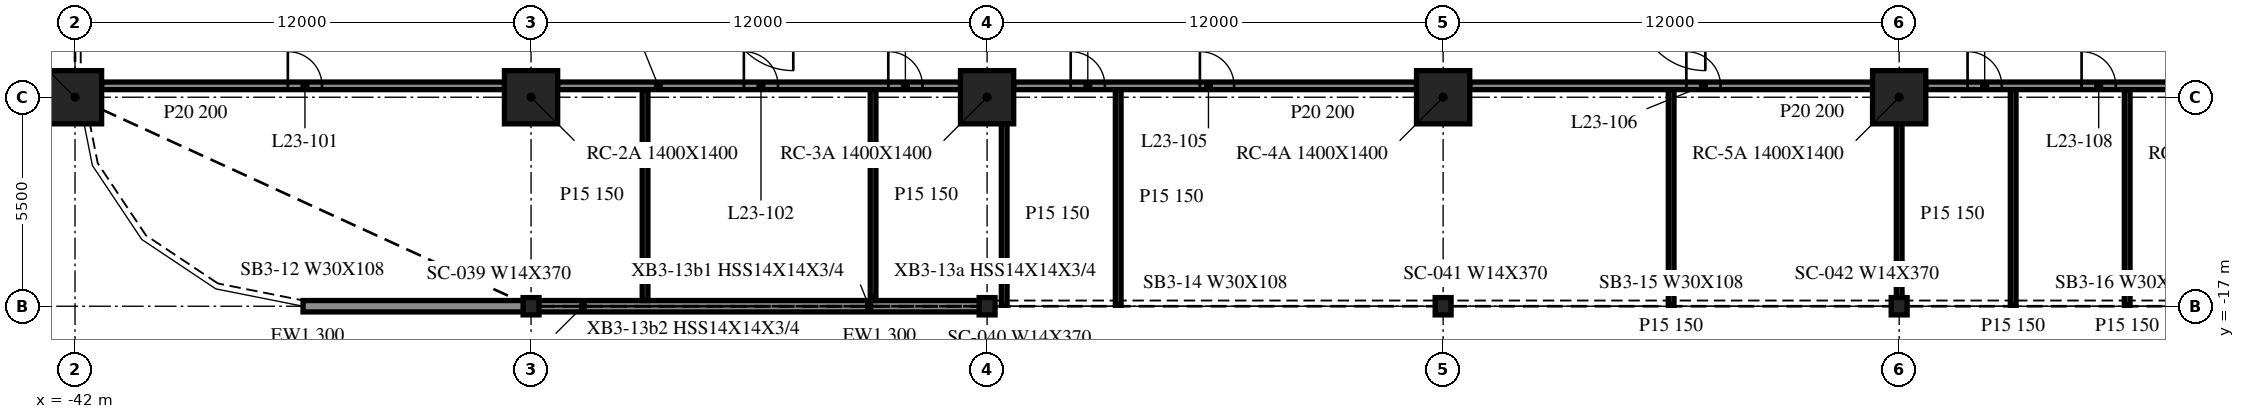
"""IFC4 building model, lengths in metres.
Left out: names, types, materials, properties, quantities, classifications, styles, units other than length and angle.
Written with IfcOpenShell. Run it as: python <this file> out.ifc"""

import sys

from ifc_helpers import new_model, si_unit, direction, frame, frame_2d, origin, origin_2d, place, context, subcontext, project, spatial, rectangle, i_section, extrude, element, fill, save


model = new_model("IFC4")
c1 = context("Model", 3, precision=1e-05, world=origin(), true_north=direction((0.0, 1.0)))
c2 = subcontext(c1, "Body", "Model", "MODEL_VIEW")
j1 = project(units=[si_unit("LENGTHUNIT", "METRE"), si_unit("PLANEANGLEUNIT", "RADIAN")], contexts=[c1])
p1 = place(None, origin())
s1 = spatial("IfcSite", under=j1, at=p1, CompositionType="ELEMENT")
p2 = place(p1, origin())
s2 = spatial("IfcBuilding", under=s1, at=p2, CompositionType="ELEMENT")
p3 = place(p2, frame((0.0, 0.0, 101.2)))
s3 = spatial("IfcBuildingStorey", under=s2, at=p3, CompositionType="ELEMENT", Elevation=101.2)
for number, where, z_axis, x_axis in (
    (1, (-42.0, -11.5, -0.34), (0.0, 0.0, 1.0), (1.0, 0.0, 0.0)),
    (2, (-30.0, -11.5, -0.34), (0.0, 0.0, 1.0), (1.0, 0.0, 0.0)),
    (3, (-18.0, -11.5, -0.34), (0.0, 0.0, 1.0), (1.0, 0.0, 0.0)),
    (4, (-6.0, -11.5, -0.34), (0.0, 0.0, 1.0), (1.0, 0.0, 0.0)),
    (5, (6.0, -11.5, -0.34), (0.0, 0.0, 1.0), (1.0, 0.0, 0.0)),
):
    element("IfcColumn", number, at=place(p3, frame(where, z_axis=z_axis, x_axis=x_axis)), inside=s3, PredefinedType="COLUMN", context=c2, shape_type="SweptSolid", body=[
        extrude(rectangle(XDim=1.4, YDim=1.4, at=origin_2d()), origin(), (0.0, 0.0, 1.0), 4.1),
    ])
for number, where, z_axis, x_axis in (
    (6, (-30.0, -17.0, -0.34), (0.0, 0.0, 1.0), (1.0, 0.0, 0.0)),
    (7, (-18.0, -17.0, -0.34), (0.0, 0.0, 1.0), (1.0, 0.0, 0.0)),
    (8, (-6.0, -17.0, -0.34), (0.0, 0.0, 1.0), (1.0, 0.0, 0.0)),
    (9, (6.0, -17.0, -0.34), (0.0, 0.0, 1.0), (1.0, 0.0, 0.0)),
):
    element("IfcColumn", number, at=place(p3, frame(where, z_axis=z_axis, x_axis=x_axis)), inside=s3, PredefinedType="COLUMN", context=c2, shape_type="SweptSolid", body=[
        extrude(i_section(OverallWidth=0.419, OverallDepth=0.455, WebThickness=0.042, FlangeThickness=0.068, at=origin_2d()), origin(), (0.0, 0.0, 1.0), 4.1),
    ])
p4 = place(p3, frame((-36.0, -17.0, 0.0), z_axis=(0.0, 0.0, 1.0), x_axis=(1.0, 0.0, 0.0)))
e10 = element("IfcWall", 10, at=p4, inside=s3, PredefinedType="NOTDEFINED", context=c2, shape_type="SweptSolid", body=[
    extrude(rectangle(XDim=5.979, YDim=0.3, at=frame_2d((2.99, 0.0))), origin(), (0.0, 0.0, 1.0), 3.003),
])
p5 = place(p3, frame((-29.979, -17.0, 0.0), z_axis=(0.0, 0.0, 1.0), x_axis=(1.0, 0.0, 0.0)))
e11 = element("IfcWall", 11, at=p5, inside=s3, PredefinedType="NOTDEFINED", context=c2, shape_type="SweptSolid", body=[
    extrude(rectangle(XDim=11.958, YDim=0.3, at=frame_2d((5.979, 0.0))), origin(), (0.0, 0.0, 1.0), 3.003),
])
p6 = place(p3, frame((-41.3, -11.2, 0.0), z_axis=(0.0, 0.0, 1.0), x_axis=(1.0, 0.0, 0.0)))
e12 = element("IfcWall", 12, at=p6, inside=s3, PredefinedType="PARTITIONING", context=c2, shape_type="SweptSolid", body=[
    extrude(rectangle(XDim=10.6, YDim=0.2, at=frame_2d((5.3, 0.0))), origin(), (0.0, 0.0, 1.0), 3.76),
])
p7 = place(p6, frame((4.9, 0.0, 0.0)))
e13 = element("IfcOpeningElement", 13, at=p7, cuts=e12, PredefinedType="OPENING", context=c2, shape_type="SweptSolid", body=[
    extrude(rectangle(XDim=0.9, YDim=2.1, at=frame_2d((0.45, 1.05))), frame((0.0, 0.11, 0.0), z_axis=(0.0, -1.0, 0.0), x_axis=(1.0, 0.0, 0.0)), (0.0, 0.0, 1.0), 0.22),
])
p8 = place(p3, frame((-29.3, -11.2, 0.0), z_axis=(0.0, 0.0, 1.0), x_axis=(1.0, 0.0, 0.0)))
e14 = element("IfcWall", 14, at=p8, inside=s3, PredefinedType="PARTITIONING", context=c2, shape_type="SweptSolid", body=[
    extrude(rectangle(XDim=10.6, YDim=0.2, at=frame_2d((5.3, 0.0))), origin(), (0.0, 0.0, 1.0), 3.76),
])
p9 = place(p8, frame((4.9, 0.0, 0.0)))
e15 = element("IfcOpeningElement", 15, at=p9, cuts=e14, PredefinedType="OPENING", context=c2, shape_type="SweptSolid", body=[
    extrude(rectangle(XDim=0.9, YDim=2.1, at=frame_2d((0.45, 1.05))), frame((0.0, 0.11, 0.0), z_axis=(0.0, -1.0, 0.0), x_axis=(1.0, 0.0, 0.0)), (0.0, 0.0, 1.0), 0.22),
])
p10 = place(p8, frame((8.7, 0.0, 0.0)))
e16 = element("IfcOpeningElement", 16, at=p10, cuts=e14, PredefinedType="OPENING", context=c2, shape_type="SweptSolid", body=[
    extrude(rectangle(XDim=0.9, YDim=2.1, at=frame_2d((0.45, 1.05))), frame((0.0, 0.11, 0.0), z_axis=(0.0, -1.0, 0.0), x_axis=(1.0, 0.0, 0.0)), (0.0, 0.0, 1.0), 0.22),
])
p11 = place(p3, frame((-17.3, -11.2, 0.0), z_axis=(0.0, 0.0, 1.0), x_axis=(1.0, 0.0, 0.0)))
e17 = element("IfcWall", 17, at=p11, inside=s3, PredefinedType="PARTITIONING", context=c2, shape_type="SweptSolid", body=[
    extrude(rectangle(XDim=10.6, YDim=0.2, at=frame_2d((5.3, 0.0))), origin(), (0.0, 0.0, 1.0), 3.76),
])
p12 = place(p11, frame((1.5, 0.0, 0.0)))
e18 = element("IfcOpeningElement", 18, at=p12, cuts=e17, PredefinedType="OPENING", context=c2, shape_type="SweptSolid", body=[
    extrude(rectangle(XDim=0.9, YDim=2.1, at=frame_2d((0.45, 1.05))), frame((0.0, 0.11, 0.0), z_axis=(0.0, -1.0, 0.0), x_axis=(1.0, 0.0, 0.0)), (0.0, 0.0, 1.0), 0.22),
])
p13 = place(p11, frame((4.9, 0.0, 0.0)))
e19 = element("IfcOpeningElement", 19, at=p13, cuts=e17, PredefinedType="OPENING", context=c2, shape_type="SweptSolid", body=[
    extrude(rectangle(XDim=0.9, YDim=2.1, at=frame_2d((0.45, 1.05))), frame((0.0, 0.11, 0.0), z_axis=(0.0, -1.0, 0.0), x_axis=(1.0, 0.0, 0.0)), (0.0, 0.0, 1.0), 0.22),
])
p14 = place(p3, frame((-5.3, -11.2, 0.0), z_axis=(0.0, 0.0, 1.0), x_axis=(1.0, 0.0, 0.0)))
e20 = element("IfcWall", 20, at=p14, inside=s3, PredefinedType="PARTITIONING", context=c2, shape_type="SweptSolid", body=[
    extrude(rectangle(XDim=10.6, YDim=0.2, at=frame_2d((5.3, 0.0))), origin(), (0.0, 0.0, 1.0), 3.76),
])
p15 = place(p14, frame((5.7, 0.0, 0.0)))
e21 = element("IfcOpeningElement", 21, at=p15, cuts=e20, PredefinedType="OPENING", context=c2, shape_type="SweptSolid", body=[
    extrude(rectangle(XDim=0.9, YDim=2.1, at=frame_2d((0.45, 1.05))), frame((0.0, 0.11, 0.0), z_axis=(0.0, -1.0, 0.0), x_axis=(1.0, 0.0, 0.0)), (0.0, 0.0, 1.0), 0.22),
])
p16 = place(p3, frame((6.7, -11.2, 0.0), z_axis=(0.0, 0.0, 1.0), x_axis=(1.0, 0.0, 0.0)))
e22 = element("IfcWall", 22, at=p16, inside=s3, PredefinedType="PARTITIONING", context=c2, shape_type="SweptSolid", body=[
    extrude(rectangle(XDim=10.6, YDim=0.2, at=frame_2d((5.3, 0.0))), origin(), (0.0, 0.0, 1.0), 3.76),
])
p17 = place(p16, frame((1.1, 0.0, 0.0)))
e23 = element("IfcOpeningElement", 23, at=p17, cuts=e22, PredefinedType="OPENING", context=c2, shape_type="SweptSolid", body=[
    extrude(rectangle(XDim=0.9, YDim=2.1, at=frame_2d((0.45, 1.05))), frame((0.0, 0.11, 0.0), z_axis=(0.0, -1.0, 0.0), x_axis=(1.0, 0.0, 0.0)), (0.0, 0.0, 1.0), 0.22),
])
p18 = place(p16, frame((4.1, 0.0, 0.0)))
e24 = element("IfcOpeningElement", 24, at=p18, cuts=e22, PredefinedType="OPENING", context=c2, shape_type="SweptSolid", body=[
    extrude(rectangle(XDim=0.9, YDim=2.1, at=frame_2d((0.45, 1.05))), frame((0.0, 0.11, 0.0), z_axis=(0.0, -1.0, 0.0), x_axis=(1.0, 0.0, 0.0)), (0.0, 0.0, 1.0), 0.22),
])
for number, where, z_axis, x_axis in (
    (25, (-27.0, -16.85, 0.0), (0.0, 0.0, 1.0), (0.0, 1.0, 0.0)),
    (26, (-21.0, -16.85, 0.0), (0.0, 0.0, 1.0), (0.0, 1.0, 0.0)),
):
    element("IfcWall", number, at=place(p3, frame(where, z_axis=z_axis, x_axis=x_axis)), inside=s3, PredefinedType="PARTITIONING", context=c2, shape_type="SweptSolid", body=[
        extrude(rectangle(XDim=5.55, YDim=0.15, at=frame_2d((2.775, 0.0))), origin(), (0.0, 0.0, 1.0), 3.76),
    ])
p19 = place(p3, frame((-17.55, -16.975, 0.0), z_axis=(0.0, 0.0, 1.0), x_axis=(0.0, 1.0, 0.0)))
e27 = element("IfcWall", 27, at=p19, inside=s3, PredefinedType="PARTITIONING", context=c2, shape_type="SweptSolid", body=[
    extrude(rectangle(XDim=4.775, YDim=0.15, at=frame_2d((2.388, 0.0))), origin(), (0.0, 0.0, 1.0), 3.76),
])
for number, where, z_axis, x_axis in (
    (28, (-14.55, -16.975, 0.0), (0.0, 0.0, 1.0), (0.0, 1.0, 0.0)),
    (29, (0.0, -16.975, 0.0), (0.0, 0.0, 1.0), (0.0, 1.0, 0.0)),
):
    element("IfcWall", number, at=place(p3, frame(where, z_axis=z_axis, x_axis=x_axis)), inside=s3, PredefinedType="PARTITIONING", context=c2, shape_type="SweptSolid", body=[
        extrude(rectangle(XDim=5.675, YDim=0.15, at=frame_2d((2.837, 0.0))), origin(), (0.0, 0.0, 1.0), 3.76),
    ])
p20 = place(p3, frame((6.0, -16.975, 0.0), z_axis=(0.0, 0.0, 1.0), x_axis=(0.0, 1.0, 0.0)))
e30 = element("IfcWall", 30, at=p20, inside=s3, PredefinedType="PARTITIONING", context=c2, shape_type="SweptSolid", body=[
    extrude(rectangle(XDim=4.775, YDim=0.15, at=frame_2d((2.388, 0.0))), origin(), (0.0, 0.0, 1.0), 3.76),
])
for number, where, z_axis, x_axis in (
    (31, (9.0, -16.975, 0.0), (0.0, 0.0, 1.0), (0.0, 1.0, 0.0)),
    (32, (12.0, -16.975, 0.0), (0.0, 0.0, 1.0), (0.0, 1.0, 0.0)),
):
    element("IfcWall", number, at=place(p3, frame(where, z_axis=z_axis, x_axis=x_axis)), inside=s3, PredefinedType="PARTITIONING", context=c2, shape_type="SweptSolid", body=[
        extrude(rectangle(XDim=5.675, YDim=0.15, at=frame_2d((2.837, 0.0))), origin(), (0.0, 0.0, 1.0), 3.76),
    ])
p21 = place(p7, origin())
e33 = element("IfcDoor", 33, at=p21, inside=s3, OperationType="SINGLE_SWING_LEFT", PredefinedType="DOOR", context=c2, shape_type="SweptSolid", body=[
    extrude(rectangle(XDim=0.9, YDim=2.1, at=frame_2d((0.45, 1.05))), frame((0.0, 0.025, 0.0), z_axis=(0.0, -1.0, 0.0), x_axis=(1.0, 0.0, 0.0)), (0.0, 0.0, 1.0), 0.05),
])
fill(e13, e33)
p22 = place(p9, origin())
e34 = element("IfcDoor", 34, at=p22, inside=s3, OperationType="SINGLE_SWING_LEFT", PredefinedType="DOOR", context=c2, shape_type="SweptSolid", body=[
    extrude(rectangle(XDim=0.9, YDim=2.1, at=frame_2d((0.45, 1.05))), frame((0.0, 0.025, 0.0), z_axis=(0.0, -1.0, 0.0), x_axis=(1.0, 0.0, 0.0)), (0.0, 0.0, 1.0), 0.05),
])
fill(e15, e34)
p23 = place(p10, origin())
e35 = element("IfcDoor", 35, at=p23, inside=s3, OperationType="SINGLE_SWING_LEFT", PredefinedType="DOOR", context=c2, shape_type="SweptSolid", body=[
    extrude(rectangle(XDim=0.9, YDim=2.1, at=frame_2d((0.45, 1.05))), frame((0.0, 0.025, 0.0), z_axis=(0.0, -1.0, 0.0), x_axis=(1.0, 0.0, 0.0)), (0.0, 0.0, 1.0), 0.05),
])
fill(e16, e35)
p24 = place(p12, origin())
e36 = element("IfcDoor", 36, at=p24, inside=s3, OperationType="SINGLE_SWING_RIGHT", PredefinedType="DOOR", context=c2, shape_type="SweptSolid", body=[
    extrude(rectangle(XDim=0.9, YDim=2.1, at=frame_2d((0.45, 1.05))), frame((0.0, 0.025, 0.0), z_axis=(0.0, -1.0, 0.0), x_axis=(1.0, 0.0, 0.0)), (0.0, 0.0, 1.0), 0.05),
])
fill(e18, e36)
p25 = place(p13, origin())
e37 = element("IfcDoor", 37, at=p25, inside=s3, OperationType="SINGLE_SWING_LEFT", PredefinedType="DOOR", context=c2, shape_type="SweptSolid", body=[
    extrude(rectangle(XDim=0.9, YDim=2.1, at=frame_2d((0.45, 1.05))), frame((0.0, 0.025, 0.0), z_axis=(0.0, -1.0, 0.0), x_axis=(1.0, 0.0, 0.0)), (0.0, 0.0, 1.0), 0.05),
])
fill(e19, e37)
p26 = place(p15, origin())
e38 = element("IfcDoor", 38, at=p26, inside=s3, OperationType="SINGLE_SWING_LEFT", PredefinedType="DOOR", context=c2, shape_type="SweptSolid", body=[
    extrude(rectangle(XDim=0.9, YDim=2.1, at=frame_2d((0.45, 1.05))), frame((0.0, 0.025, 0.0), z_axis=(0.0, -1.0, 0.0), x_axis=(1.0, 0.0, 0.0)), (0.0, 0.0, 1.0), 0.05),
])
fill(e21, e38)
p27 = place(p17, origin())
e39 = element("IfcDoor", 39, at=p27, inside=s3, OperationType="SINGLE_SWING_RIGHT", PredefinedType="DOOR", context=c2, shape_type="SweptSolid", body=[
    extrude(rectangle(XDim=0.9, YDim=2.1, at=frame_2d((0.45, 1.05))), frame((0.0, 0.025, 0.0), z_axis=(0.0, -1.0, 0.0), x_axis=(1.0, 0.0, 0.0)), (0.0, 0.0, 1.0), 0.05),
])
fill(e23, e39)
p28 = place(p18, origin())
e40 = element("IfcDoor", 40, at=p28, inside=s3, OperationType="SINGLE_SWING_RIGHT", PredefinedType="DOOR", context=c2, shape_type="SweptSolid", body=[
    extrude(rectangle(XDim=0.9, YDim=2.1, at=frame_2d((0.45, 1.05))), frame((0.0, 0.025, 0.0), z_axis=(0.0, -1.0, 0.0), x_axis=(1.0, 0.0, 0.0)), (0.0, 0.0, 1.0), 0.05),
])
fill(e24, e40)
save(model, sys.argv[1])
